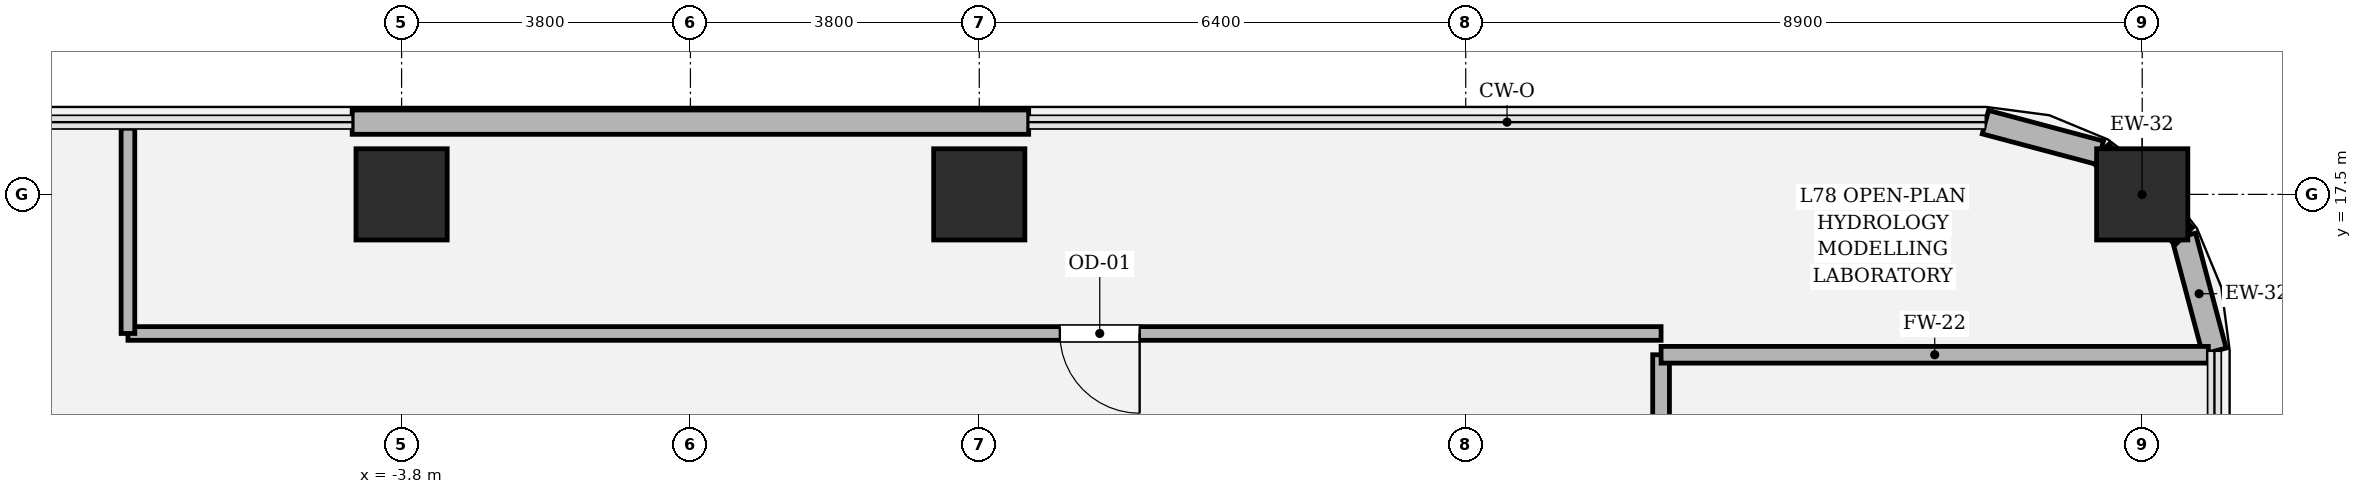
"""IFC4 building model, lengths in metres.
Left out: names, types, materials, properties, quantities, classifications, styles, units other than length and angle.
Written with IfcOpenShell. Run it as: python <this file> out.ifc"""

import sys

from ifc_helpers import new_model, si_unit, direction, frame, frame_2d, origin, origin_2d, place, context, subcontext, project, spatial, rectangle, hollow_rectangle, extrude, element, fill, save


model = new_model("IFC4")
c1 = context("Model", 3, precision=1e-05, world=origin(), true_north=direction((0.0, 1.0)))
c2 = subcontext(c1, "Body", "Model", "MODEL_VIEW")
j1 = project(units=[si_unit("LENGTHUNIT", "METRE"), si_unit("PLANEANGLEUNIT", "RADIAN")], contexts=[c1])
p1 = place(None, origin())
s1 = spatial("IfcSite", under=j1, at=p1, CompositionType="ELEMENT")
p2 = place(p1, origin())
s2 = spatial("IfcBuilding", under=s1, at=p2, CompositionType="ELEMENT")
p3 = place(p2, frame((0.0, 0.0, 330.0)))
s3 = spatial("IfcBuildingStorey", under=s2, at=p3, CompositionType="ELEMENT", Elevation=330.0)
for number, where, z_axis, x_axis in (
    (1, (19.1, 17.5, 0.0), (0.0, 0.0, 1.0), (1.0, 0.0, 0.0)),
    (2, (3.8, 17.5, 0.0), (0.0, 0.0, 1.0), (1.0, 0.0, 0.0)),
    (3, (-3.8, 17.5, 0.0), (0.0, 0.0, 1.0), (1.0, 0.0, 0.0)),
):
    element("IfcColumn", number, at=place(p3, frame(where, z_axis=z_axis, x_axis=x_axis)), inside=s3, PredefinedType="COLUMN", context=c2, shape_type="SweptSolid", body=[
        extrude(hollow_rectangle(XDim=1.2, YDim=1.2, WallThickness=0.035, at=origin_2d()), origin(), (0.0, 0.0, 1.0), 4.2),
    ])
p4 = place(p3, frame((20.05, 15.437, 0.0), z_axis=(0.0, 0.0, 1.0), x_axis=(-0.257847112249, 0.966185730957, 0.0)))
e4 = element("IfcWall", 4, at=p4, inside=s3, PredefinedType="SOLIDWALL", context=c2, shape_type="SweptSolid", body=[
    extrude(rectangle(XDim=1.565, YDim=0.32, at=frame_2d((0.783, 0.0))), origin(), (0.0, 0.0, 1.0), 3.94),
])
p5 = place(p3, frame((19.646, 16.949, 0.0), z_axis=(0.0, 0.0, 1.0), x_axis=(-0.707106781187, 0.707106781187, 0.0)))
e5 = element("IfcWall", 5, at=p5, inside=s3, PredefinedType="SOLIDWALL", context=c2, shape_type="SweptSolid", body=[
    extrude(rectangle(XDim=1.552, YDim=0.32, at=frame_2d((0.776, 0.0))), origin(), (0.0, 0.0, 1.0), 2.614),
])
p6 = place(p3, frame((18.549, 18.047, 0.0), z_axis=(0.0, 0.0, 1.0), x_axis=(-0.966224582397, 0.257701486942, 0.0)))
e6 = element("IfcWall", 6, at=p6, inside=s3, PredefinedType="SOLIDWALL", context=c2, shape_type="SweptSolid", body=[
    extrude(rectangle(XDim=1.565, YDim=0.32, at=frame_2d((0.783, 0.0))), origin(), (0.0, 0.0, 1.0), 3.94),
])
p7 = place(p3, frame((4.45, 18.45, 0.0), z_axis=(0.0, 0.0, 1.0), x_axis=(-1.0, 0.0, 0.0)))
e7 = element("IfcWall", 7, at=p7, inside=s3, PredefinedType="SOLIDWALL", context=c2, shape_type="SweptSolid", body=[
    extrude(rectangle(XDim=8.9, YDim=0.32, at=frame_2d((4.45, 0.0))), origin(), (0.0, 0.0, 1.0), 3.94),
])
p8 = place(p3, frame((12.77, 13.38, 0.0), z_axis=(0.0, 0.0, 1.0), x_axis=(0.0, 1.0, 0.0)))
e8 = element("IfcWall", 8, at=p8, inside=s3, PredefinedType="SOLIDWALL", context=c2, shape_type="SweptSolid", body=[
    extrude(rectangle(XDim=2.01, YDim=0.22, at=frame_2d((1.005, 0.0))), origin(), (0.0, 0.0, 1.0), 3.574),
])
p9 = place(p3, frame((12.77, 15.39, 0.0), z_axis=(0.0, 0.0, 1.0), x_axis=(1.0, 0.0, 0.0)))
e9 = element("IfcWall", 9, at=p9, inside=s3, PredefinedType="SOLIDWALL", context=c2, shape_type="SweptSolid", body=[
    extrude(rectangle(XDim=7.2, YDim=0.22, at=frame_2d((3.6, 0.0))), origin(), (0.0, 0.0, 1.0), 2.614),
])
p10 = place(p3, frame((12.77, 15.67, 0.0), z_axis=(0.0, 0.0, 1.0), x_axis=(-1.0, 0.0, 0.0)))
e10 = element("IfcWall", 10, at=p10, inside=s3, PredefinedType="PARTITIONING", context=c2, shape_type="SweptSolid", body=[
    extrude(rectangle(XDim=20.17, YDim=0.18, at=frame_2d((10.085, 0.0))), origin(), (0.0, 0.0, 1.0), 2.614),
])
p11 = place(p10, frame((6.86, 0.0, 0.0)))
e11 = element("IfcOpeningElement", 11, at=p11, cuts=e10, PredefinedType="OPENING", context=c2, shape_type="SweptSolid", body=[
    extrude(rectangle(XDim=1.05, YDim=2.2, at=frame_2d((0.525, 1.1))), frame((0.0, 0.1, 0.0), z_axis=(0.0, -1.0, 0.0), x_axis=(1.0, 0.0, 0.0)), (0.0, 0.0, 1.0), 0.2),
])
p12 = place(p3, frame((-7.4, 15.67, 0.0), z_axis=(0.0, 0.0, 1.0), x_axis=(0.0, 1.0, 0.0)))
e12 = element("IfcWall", 12, at=p12, inside=s3, PredefinedType="PARTITIONING", context=c2, shape_type="SweptSolid", body=[
    extrude(rectangle(XDim=2.7, YDim=0.18, at=frame_2d((1.35, 0.0))), origin(), (0.0, 0.0, 1.0), 2.614),
])
p13 = place(p11, origin())
e13 = element("IfcDoor", 13, at=p13, inside=s3, OperationType="SINGLE_SWING_LEFT", PredefinedType="DOOR", context=c2, shape_type="SweptSolid", body=[
    extrude(rectangle(XDim=1.05, YDim=2.2, at=frame_2d((0.525, 1.1))), frame((0.0, 0.025, 0.0), z_axis=(0.0, -1.0, 0.0), x_axis=(1.0, 0.0, 0.0)), (0.0, 0.0, 1.0), 0.05),
])
fill(e11, e13)
save(model, sys.argv[1])
